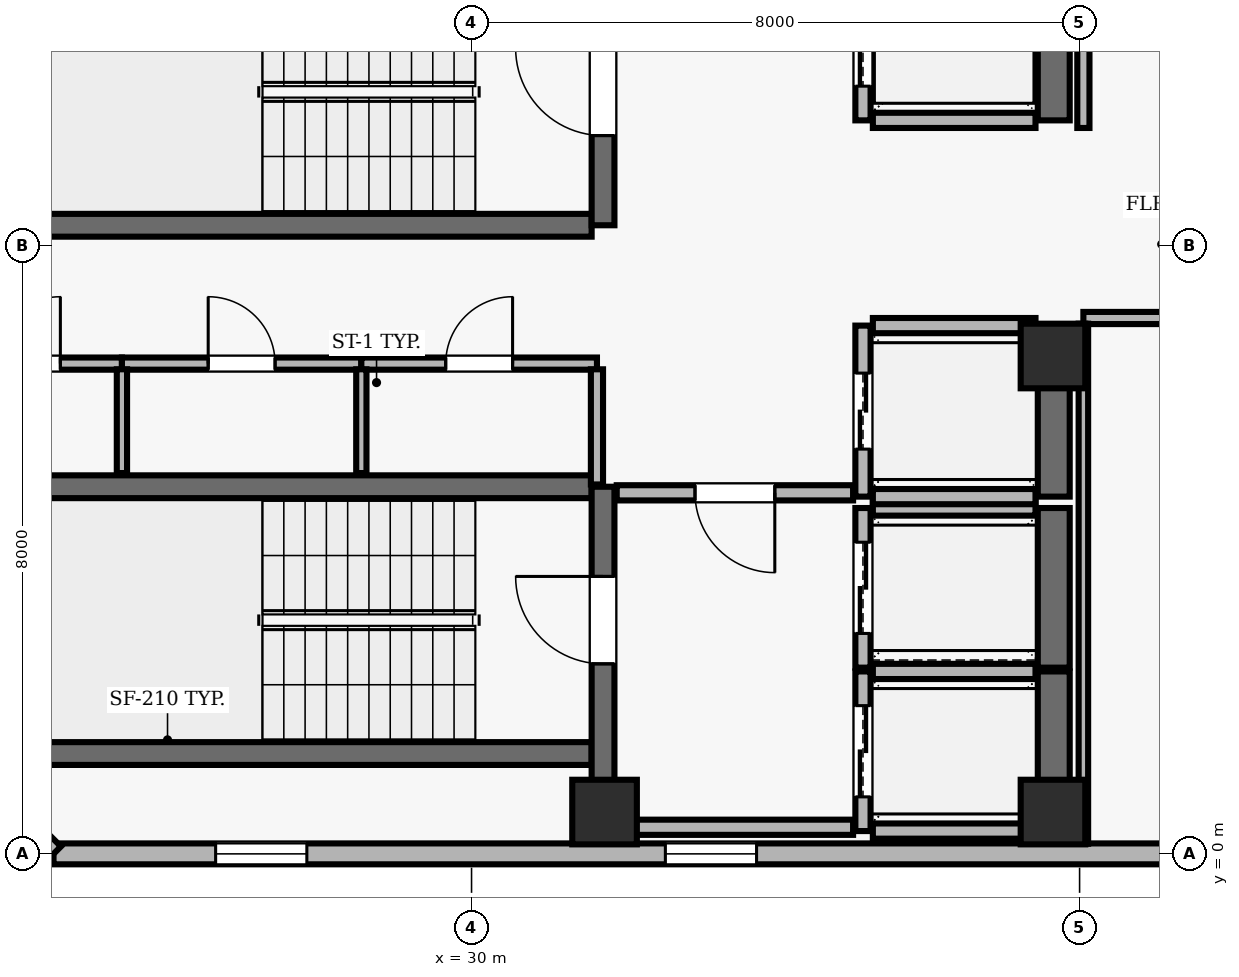
"""IFC4 building model, lengths in metres.
Left out: names, types, materials, properties, quantities, classifications, styles, units other than length and angle.
Written with IfcOpenShell. Run it as: python <this file> out.ifc"""

import sys

from ifc_helpers import new_model, si_unit, direction, frame, frame_2d, origin, origin_2d, place, context, subcontext, project, spatial, rectangle, extrude, element, fill, save


model = new_model("IFC4")
c1 = context("Model", 3, precision=1e-05, world=origin(), true_north=direction((0.0, 1.0)))
c2 = subcontext(c1, "Body", "Model", "MODEL_VIEW")
j1 = project(units=[si_unit("LENGTHUNIT", "METRE"), si_unit("PLANEANGLEUNIT", "RADIAN")], contexts=[c1])
p1 = place(None, origin())
s1 = spatial("IfcSite", under=j1, at=p1, CompositionType="ELEMENT")
p2 = place(p1, origin())
s2 = spatial("IfcBuilding", under=s1, at=p2, CompositionType="ELEMENT")
p3 = place(p2, frame((0.0, 0.0, 248.2)))
s3 = spatial("IfcBuildingStorey", under=s2, at=p3, CompositionType="ELEMENT", Elevation=248.2)
for number, where, z_axis, x_axis in (
    (1, (31.75, 0.55, 0.0), (0.0, 0.0, 1.0), (1.0, 0.0, 0.0)),
    (2, (37.65, 0.55, 0.0), (0.0, 0.0, 1.0), (1.0, 0.0, 0.0)),
    (3, (37.65, 6.55, 0.0), (0.0, 0.0, 1.0), (1.0, 0.0, 0.0)),
):
    element("IfcColumn", number, at=place(p3, frame(where, z_axis=z_axis, x_axis=x_axis)), inside=s3, PredefinedType="COLUMN", context=c2, shape_type="SweptSolid", body=[
        extrude(rectangle(XDim=0.85, YDim=0.85, at=origin_2d()), origin(), (0.0, 0.0, 1.0), 3.9),
    ])
p4 = place(p3, frame((24.5, 0.0, 0.0), z_axis=(0.0, 0.0, 1.0), x_axis=(1.0, 0.0, 0.0)))
e4 = element("IfcWall", 4, at=p4, inside=s3, PredefinedType="SOLIDWALL", context=c2, shape_type="SweptSolid", body=[
    extrude(rectangle(XDim=32.8, YDim=0.275, at=frame_2d((16.4, 0.0))), origin(), (0.0, 0.0, 1.0), 3.69),
])
p5 = place(p4, frame((2.133, 0.0, 0.9)))
e5 = element("IfcOpeningElement", 5, at=p5, cuts=e4, PredefinedType="OPENING", context=c2, shape_type="SweptSolid", body=[
    extrude(rectangle(XDim=1.2, YDim=1.6, at=frame_2d((0.6, 0.8))), frame((0.0, 0.147, 0.0), z_axis=(0.0, -1.0, 0.0), x_axis=(1.0, 0.0, 0.0)), (0.0, 0.0, 1.0), 0.295),
])
p6 = place(p4, frame((8.05, 0.0, 0.9)))
e6 = element("IfcOpeningElement", 6, at=p6, cuts=e4, PredefinedType="OPENING", context=c2, shape_type="SweptSolid", body=[
    extrude(rectangle(XDim=1.2, YDim=1.6, at=frame_2d((0.6, 0.8))), frame((0.0, 0.147, 0.0), z_axis=(0.0, -1.0, 0.0), x_axis=(1.0, 0.0, 0.0)), (0.0, 0.0, 1.0), 0.295),
])
p7 = place(p4, frame((24.9, 0.0, 0.9)))
e7 = element("IfcOpeningElement", 7, at=p7, cuts=e4, PredefinedType="OPENING", context=c2, shape_type="SweptSolid", body=[
    extrude(rectangle(XDim=1.2, YDim=1.6, at=frame_2d((0.6, 0.8))), frame((0.0, 0.147, 0.0), z_axis=(0.0, -1.0, 0.0), x_axis=(1.0, 0.0, 0.0)), (0.0, 0.0, 1.0), 0.295),
])
p8 = place(p3, frame((22.0, 2.5, 0.0), z_axis=(0.0, 0.0, 1.0), x_axis=(0.707106781187, -0.707106781187, 0.0)))
e8 = element("IfcWall", 8, at=p8, inside=s3, PredefinedType="SOLIDWALL", context=c2, shape_type="SweptSolid", body=[
    extrude(rectangle(XDim=3.536, YDim=0.275, at=frame_2d((1.768, 0.0))), origin(), (0.0, 0.0, 1.0), 3.69),
])
for number, where, z_axis, x_axis in (
    (9, (31.58, 4.83, 0.0), (0.0, 0.0, 1.0), (-1.0, 0.0, 0.0)),
    (10, (23.22, 1.32, 0.0), (0.0, 0.0, 1.0), (1.0, 0.0, 0.0)),
):
    element("IfcWall", number, at=place(p3, frame(where, z_axis=z_axis, x_axis=x_axis)), inside=s3, PredefinedType="SHEAR", context=c2, shape_type="SweptSolid", body=[
        extrude(rectangle(XDim=8.36, YDim=0.3, at=frame_2d((4.18, 0.0))), origin(), (0.0, 0.0, 1.0), 3.69),
    ])
p9 = place(p3, frame((31.73, 0.96, 0.0), z_axis=(0.0, 0.0, 1.0), x_axis=(0.0, 1.0, 0.0)))
e11 = element("IfcWall", 11, at=p9, inside=s3, PredefinedType="SHEAR", context=c2, shape_type="SweptSolid", body=[
    extrude(rectangle(XDim=3.87, YDim=0.3, at=frame_2d((1.935, 0.0))), origin(), (0.0, 0.0, 1.0), 3.69),
])
p10 = place(p9, frame((1.54, 0.0, 0.0)))
e12 = element("IfcOpeningElement", 12, at=p10, cuts=e11, PredefinedType="OPENING", context=c2, shape_type="SweptSolid", body=[
    extrude(rectangle(XDim=1.15, YDim=2.15, at=frame_2d((0.575, 1.075))), frame((0.0, 0.16, 0.0), z_axis=(0.0, -1.0, 0.0), x_axis=(1.0, 0.0, 0.0)), (0.0, 0.0, 1.0), 0.32),
])
p11 = place(p3, frame((23.22, 8.27, 0.0), z_axis=(0.0, 0.0, 1.0), x_axis=(1.0, 0.0, 0.0)))
e13 = element("IfcWall", 13, at=p11, inside=s3, PredefinedType="SHEAR", context=c2, shape_type="SweptSolid", body=[
    extrude(rectangle(XDim=8.36, YDim=0.3, at=frame_2d((4.18, 0.0))), origin(), (0.0, 0.0, 1.0), 3.69),
])
p12 = place(p3, frame((31.73, 8.27, 0.0), z_axis=(0.0, 0.0, 1.0), x_axis=(0.0, 1.0, 0.0)))
e14 = element("IfcWall", 14, at=p12, inside=s3, PredefinedType="SHEAR", context=c2, shape_type="SweptSolid", body=[
    extrude(rectangle(XDim=3.51, YDim=0.3, at=frame_2d((1.755, 0.0))), origin(), (0.0, 0.0, 1.0), 3.69),
])
p13 = place(p12, frame((1.18, 0.0, 0.0)))
e15 = element("IfcOpeningElement", 15, at=p13, cuts=e14, PredefinedType="OPENING", context=c2, shape_type="SweptSolid", body=[
    extrude(rectangle(XDim=1.15, YDim=2.15, at=frame_2d((0.575, 1.075))), frame((0.0, 0.16, 0.0), z_axis=(0.0, -1.0, 0.0), x_axis=(1.0, 0.0, 0.0)), (0.0, 0.0, 1.0), 0.32),
])
p14 = place(p3, frame((35.15, 2.4, 0.0), z_axis=(0.0, 0.0, 1.0), x_axis=(0.0, -1.0, 0.0)))
e16 = element("IfcWall", 16, at=p14, inside=s3, PredefinedType="SOLIDWALL", context=c2, shape_type="SweptSolid", body=[
    extrude(rectangle(XDim=2.1, YDim=0.2, at=frame_2d((1.05, 0.0))), origin(), (0.0, 0.0, 1.0), 3.69),
])
p15 = place(p14, frame((0.45, 0.0, 0.0)))
e17 = element("IfcOpeningElement", 17, at=p15, cuts=e16, PredefinedType="OPENING", context=c2, shape_type="SweptSolid", body=[
    extrude(rectangle(XDim=1.2, YDim=2.15, at=frame_2d((0.6, 1.075))), frame((0.0, 0.11, 0.0), z_axis=(0.0, -1.0, 0.0), x_axis=(1.0, 0.0, 0.0)), (0.0, 0.0, 1.0), 0.22),
])
p16 = place(p3, frame((37.66, 0.3, 0.0), z_axis=(0.0, 0.0, 1.0), x_axis=(0.0, 1.0, 0.0)))
e18 = element("IfcWall", 18, at=p16, inside=s3, PredefinedType="SHEAR", context=c2, shape_type="SweptSolid", body=[
    extrude(rectangle(XDim=2.1, YDim=0.42, at=frame_2d((1.05, 0.0))), origin(), (0.0, 0.0, 1.0), 3.69),
])
for number, where, z_axis, x_axis in (
    (19, (35.28, 0.3, 0.0), (0.0, 0.0, 1.0), (1.0, 0.0, 0.0)),
    (20, (37.42, 2.4, 0.0), (0.0, 0.0, 1.0), (-1.0, 0.0, 0.0)),
):
    element("IfcWall", number, at=place(p3, frame(where, z_axis=z_axis, x_axis=x_axis)), inside=s3, PredefinedType="SOLIDWALL", context=c2, shape_type="SweptSolid", body=[
        extrude(rectangle(XDim=2.14, YDim=0.2, at=frame_2d((1.07, 0.0))), origin(), (0.0, 0.0, 1.0), 3.69),
    ])
p17 = place(p3, frame((35.15, 4.55, 0.0), z_axis=(0.0, 0.0, 1.0), x_axis=(0.0, -1.0, 0.0)))
e21 = element("IfcWall", 21, at=p17, inside=s3, PredefinedType="SOLIDWALL", context=c2, shape_type="SweptSolid", body=[
    extrude(rectangle(XDim=2.1, YDim=0.2, at=frame_2d((1.05, 0.0))), origin(), (0.0, 0.0, 1.0), 3.69),
])
p18 = place(p17, frame((0.45, 0.0, 0.0)))
e22 = element("IfcOpeningElement", 22, at=p18, cuts=e21, PredefinedType="OPENING", context=c2, shape_type="SweptSolid", body=[
    extrude(rectangle(XDim=1.2, YDim=2.15, at=frame_2d((0.6, 1.075))), frame((0.0, 0.11, 0.0), z_axis=(0.0, -1.0, 0.0), x_axis=(1.0, 0.0, 0.0)), (0.0, 0.0, 1.0), 0.22),
])
p19 = place(p3, frame((37.66, 2.45, 0.0), z_axis=(0.0, 0.0, 1.0), x_axis=(0.0, 1.0, 0.0)))
e23 = element("IfcWall", 23, at=p19, inside=s3, PredefinedType="SHEAR", context=c2, shape_type="SweptSolid", body=[
    extrude(rectangle(XDim=2.1, YDim=0.42, at=frame_2d((1.05, 0.0))), origin(), (0.0, 0.0, 1.0), 3.69),
])
p20 = place(p3, frame((37.42, 4.55, 0.0), z_axis=(0.0, 0.0, 1.0), x_axis=(-1.0, 0.0, 0.0)))
e24 = element("IfcWall", 24, at=p20, inside=s3, PredefinedType="SOLIDWALL", context=c2, shape_type="SweptSolid", body=[
    extrude(rectangle(XDim=2.14, YDim=0.2, at=frame_2d((1.07, 0.0))), origin(), (0.0, 0.0, 1.0), 3.69),
])
p21 = place(p3, frame((35.15, 6.95, 0.0), z_axis=(0.0, 0.0, 1.0), x_axis=(0.0, -1.0, 0.0)))
e25 = element("IfcWall", 25, at=p21, inside=s3, PredefinedType="SOLIDWALL", context=c2, shape_type="SweptSolid", body=[
    extrude(rectangle(XDim=2.25, YDim=0.2, at=frame_2d((1.125, 0.0))), origin(), (0.0, 0.0, 1.0), 3.69),
])
p22 = place(p21, frame((0.625, 0.0, 0.0)))
e26 = element("IfcOpeningElement", 26, at=p22, cuts=e25, PredefinedType="OPENING", context=c2, shape_type="SweptSolid", body=[
    extrude(rectangle(XDim=1.0, YDim=2.1, at=frame_2d((0.5, 1.05))), frame((0.0, 0.11, 0.0), z_axis=(0.0, -1.0, 0.0), x_axis=(1.0, 0.0, 0.0)), (0.0, 0.0, 1.0), 0.22),
])
p23 = place(p3, frame((37.66, 4.7, 0.0), z_axis=(0.0, 0.0, 1.0), x_axis=(0.0, 1.0, 0.0)))
e27 = element("IfcWall", 27, at=p23, inside=s3, PredefinedType="SHEAR", context=c2, shape_type="SweptSolid", body=[
    extrude(rectangle(XDim=2.25, YDim=0.42, at=frame_2d((1.125, 0.0))), origin(), (0.0, 0.0, 1.0), 3.69),
])
for number, where, z_axis, x_axis in (
    (28, (35.28, 4.7, 0.0), (0.0, 0.0, 1.0), (1.0, 0.0, 0.0)),
    (29, (37.42, 6.95, 0.0), (0.0, 0.0, 1.0), (-1.0, 0.0, 0.0)),
):
    element("IfcWall", number, at=place(p3, frame(where, z_axis=z_axis, x_axis=x_axis)), inside=s3, PredefinedType="SOLIDWALL", context=c2, shape_type="SweptSolid", body=[
        extrude(rectangle(XDim=2.14, YDim=0.2, at=frame_2d((1.07, 0.0))), origin(), (0.0, 0.0, 1.0), 3.69),
    ])
p24 = place(p3, frame((35.15, 11.55, 0.0), z_axis=(0.0, 0.0, 1.0), x_axis=(0.0, -1.0, 0.0)))
e30 = element("IfcWall", 30, at=p24, inside=s3, PredefinedType="SOLIDWALL", context=c2, shape_type="SweptSolid", body=[
    extrude(rectangle(XDim=1.9, YDim=0.2, at=frame_2d((0.95, 0.0))), origin(), (0.0, 0.0, 1.0), 3.69),
])
p25 = place(p24, frame((0.45, 0.0, 0.0)))
e31 = element("IfcOpeningElement", 31, at=p25, cuts=e30, PredefinedType="OPENING", context=c2, shape_type="SweptSolid", body=[
    extrude(rectangle(XDim=1.0, YDim=2.1, at=frame_2d((0.5, 1.05))), frame((0.0, 0.11, 0.0), z_axis=(0.0, -1.0, 0.0), x_axis=(1.0, 0.0, 0.0)), (0.0, 0.0, 1.0), 0.22),
])
p26 = place(p3, frame((37.66, 9.65, 0.0), z_axis=(0.0, 0.0, 1.0), x_axis=(0.0, 1.0, 0.0)))
e32 = element("IfcWall", 32, at=p26, inside=s3, PredefinedType="SHEAR", context=c2, shape_type="SweptSolid", body=[
    extrude(rectangle(XDim=1.9, YDim=0.42, at=frame_2d((0.95, 0.0))), origin(), (0.0, 0.0, 1.0), 3.69),
])
p27 = place(p3, frame((35.28, 9.65, 0.0), z_axis=(0.0, 0.0, 1.0), x_axis=(1.0, 0.0, 0.0)))
e33 = element("IfcWall", 33, at=p27, inside=s3, PredefinedType="SOLIDWALL", context=c2, shape_type="SweptSolid", body=[
    extrude(rectangle(XDim=2.14, YDim=0.2, at=frame_2d((1.07, 0.0))), origin(), (0.0, 0.0, 1.0), 3.69),
])
p28 = place(p3, frame((22.2, 6.45, 0.0), z_axis=(0.0, 0.0, 1.0), x_axis=(1.0, 0.0, 0.0)))
e34 = element("IfcWall", 34, at=p28, inside=s3, PredefinedType="PARTITIONING", context=c2, shape_type="SweptSolid", body=[
    extrude(rectangle(XDim=3.2, YDim=0.16, at=frame_2d((1.6, 0.0))), origin(), (0.0, 0.0, 1.0), 3.69),
])
p29 = place(p28, frame((1.51, 0.0, 0.0)))
e35 = element("IfcOpeningElement", 35, at=p29, cuts=e34, PredefinedType="OPENING", context=c2, shape_type="SweptSolid", body=[
    extrude(rectangle(XDim=0.88, YDim=2.1, at=frame_2d((0.44, 1.05))), frame((0.0, 0.09, 0.0), z_axis=(0.0, -1.0, 0.0), x_axis=(1.0, 0.0, 0.0)), (0.0, 0.0, 1.0), 0.18),
])
p30 = place(p3, frame((25.4, 6.45, 0.0), z_axis=(0.0, 0.0, 1.0), x_axis=(1.0, 0.0, 0.0)))
e36 = element("IfcWall", 36, at=p30, inside=s3, PredefinedType="PARTITIONING", context=c2, shape_type="SweptSolid", body=[
    extrude(rectangle(XDim=3.15, YDim=0.16, at=frame_2d((1.575, 0.0))), origin(), (0.0, 0.0, 1.0), 3.69),
])
p31 = place(p30, frame((1.135, 0.0, 0.0)))
e37 = element("IfcOpeningElement", 37, at=p31, cuts=e36, PredefinedType="OPENING", context=c2, shape_type="SweptSolid", body=[
    extrude(rectangle(XDim=0.88, YDim=2.1, at=frame_2d((0.44, 1.05))), frame((0.0, 0.09, 0.0), z_axis=(0.0, -1.0, 0.0), x_axis=(1.0, 0.0, 0.0)), (0.0, 0.0, 1.0), 0.18),
])
p32 = place(p3, frame((28.55, 6.45, 0.0), z_axis=(0.0, 0.0, 1.0), x_axis=(1.0, 0.0, 0.0)))
e38 = element("IfcWall", 38, at=p32, inside=s3, PredefinedType="PARTITIONING", context=c2, shape_type="SweptSolid", body=[
    extrude(rectangle(XDim=3.1, YDim=0.16, at=frame_2d((1.55, 0.0))), origin(), (0.0, 0.0, 1.0), 3.69),
])
p33 = place(p32, frame((1.11, 0.0, 0.0)))
e39 = element("IfcOpeningElement", 39, at=p33, cuts=e38, PredefinedType="OPENING", context=c2, shape_type="SweptSolid", body=[
    extrude(rectangle(XDim=0.88, YDim=2.1, at=frame_2d((0.44, 1.05))), frame((0.0, 0.09, 0.0), z_axis=(0.0, -1.0, 0.0), x_axis=(1.0, 0.0, 0.0)), (0.0, 0.0, 1.0), 0.18),
])
p34 = place(p3, frame((31.65, 0.35, 0.0), z_axis=(0.0, 0.0, 1.0), x_axis=(1.0, 0.0, 0.0)))
e40 = element("IfcWall", 40, at=p34, inside=s3, PredefinedType="SOLIDWALL", context=c2, shape_type="SweptSolid", body=[
    extrude(rectangle(XDim=3.37, YDim=0.2, at=frame_2d((1.685, 0.0))), origin(), (0.0, 0.0, 1.0), 3.69),
])
p35 = place(p3, frame((35.02, 4.75, 0.0), z_axis=(0.0, 0.0, 1.0), x_axis=(-1.0, 0.0, 0.0)))
e41 = element("IfcWall", 41, at=p35, inside=s3, PredefinedType="SOLIDWALL", context=c2, shape_type="SweptSolid", body=[
    extrude(rectangle(XDim=3.11, YDim=0.2, at=frame_2d((1.555, 0.0))), origin(), (0.0, 0.0, 1.0), 3.69),
])
p36 = place(p35, frame((1.03, 0.0, 0.0)))
e42 = element("IfcOpeningElement", 42, at=p36, cuts=e41, PredefinedType="OPENING", context=c2, shape_type="SweptSolid", body=[
    extrude(rectangle(XDim=1.05, YDim=2.15, at=frame_2d((0.525, 1.075))), frame((0.0, 0.11, 0.0), z_axis=(0.0, -1.0, 0.0), x_axis=(1.0, 0.0, 0.0)), (0.0, 0.0, 1.0), 0.22),
])
p37 = place(p3, frame((38.05, 7.05, 0.0), z_axis=(0.0, 0.0, 1.0), x_axis=(1.0, 0.0, 0.0)))
e43 = element("IfcWall", 43, at=p37, inside=s3, PredefinedType="PARTITIONING", context=c2, shape_type="SweptSolid", body=[
    extrude(rectangle(XDim=5.35, YDim=0.16, at=frame_2d((2.675, 0.0))), origin(), (0.0, 0.0, 1.0), 3.69),
])
p38 = place(p37, frame((2.175, 0.0, 0.0)))
e44 = element("IfcOpeningElement", 44, at=p38, cuts=e43, PredefinedType="OPENING", context=c2, shape_type="SweptSolid", body=[
    extrude(rectangle(XDim=1.0, YDim=2.1, at=frame_2d((0.5, 1.05))), frame((0.0, 0.09, 0.0), z_axis=(0.0, -1.0, 0.0), x_axis=(1.0, 0.0, 0.0)), (0.0, 0.0, 1.0), 0.18),
])
for number, where, z_axis, x_axis in (
    (45, (25.4, 5.01, 0.0), (0.0, 0.0, 1.0), (0.0, 1.0, 0.0)),
    (46, (28.55, 5.01, 0.0), (0.0, 0.0, 1.0), (0.0, 1.0, 0.0)),
):
    element("IfcWall", number, at=place(p3, frame(where, z_axis=z_axis, x_axis=x_axis)), inside=s3, PredefinedType="PARTITIONING", context=c2, shape_type="SweptSolid", body=[
        extrude(rectangle(XDim=1.365, YDim=0.135, at=frame_2d((0.683, 0.0))), origin(), (0.0, 0.0, 1.0), 3.69),
    ])
p39 = place(p3, frame((31.65, 4.86, 0.0), z_axis=(0.0, 0.0, 1.0), x_axis=(0.0, 1.0, 0.0)))
e47 = element("IfcWall", 47, at=p39, inside=s3, PredefinedType="PARTITIONING", context=c2, shape_type="SweptSolid", body=[
    extrude(rectangle(XDim=1.515, YDim=0.16, at=frame_2d((0.757, 0.0))), origin(), (0.0, 0.0, 1.0), 3.69),
])
p40 = place(p3, frame((38.05, 6.975, 0.0), z_axis=(0.0, 0.0, 1.0), x_axis=(0.0, -1.0, 0.0)))
e48 = element("IfcWall", 48, at=p40, inside=s3, PredefinedType="PARTITIONING", context=c2, shape_type="SweptSolid", body=[
    extrude(rectangle(XDim=6.842, YDim=0.125, at=frame_2d((3.421, 0.0))), origin(), (0.0, 0.0, 1.0), 3.221),
])
p41 = place(p3, frame((38.05, 15.925, 0.0), z_axis=(0.0, 0.0, 1.0), x_axis=(0.0, -1.0, 0.0)))
e49 = element("IfcWall", 49, at=p41, inside=s3, PredefinedType="PARTITIONING", context=c2, shape_type="SweptSolid", body=[
    extrude(rectangle(XDim=6.375, YDim=0.16, at=frame_2d((3.188, 0.0))), origin(), (0.0, 0.0, 1.0), 3.221),
])
p42 = place(p5, origin())
e50 = element("IfcWindow", 50, at=p42, inside=s3, PartitioningType="SINGLE_PANEL", PredefinedType="WINDOW", context=c2, shape_type="SweptSolid", body=[
    extrude(rectangle(XDim=1.2, YDim=1.6, at=frame_2d((0.6, 0.8))), frame((0.0, 0.03, 0.0), z_axis=(0.0, -1.0, 0.0), x_axis=(1.0, 0.0, 0.0)), (0.0, 0.0, 1.0), 0.06),
])
fill(e5, e50)
p43 = place(p6, origin())
e51 = element("IfcWindow", 51, at=p43, inside=s3, PartitioningType="SINGLE_PANEL", PredefinedType="WINDOW", context=c2, shape_type="SweptSolid", body=[
    extrude(rectangle(XDim=1.2, YDim=1.6, at=frame_2d((0.6, 0.8))), frame((0.0, 0.03, 0.0), z_axis=(0.0, -1.0, 0.0), x_axis=(1.0, 0.0, 0.0)), (0.0, 0.0, 1.0), 0.06),
])
fill(e6, e51)
p44 = place(p10, origin())
e52 = element("IfcDoor", 52, at=p44, inside=s3, OperationType="SINGLE_SWING_RIGHT", PredefinedType="DOOR", context=c2, shape_type="SweptSolid", body=[
    extrude(rectangle(XDim=1.15, YDim=2.15, at=frame_2d((0.575, 1.075))), frame((0.0, 0.025, 0.0), z_axis=(0.0, -1.0, 0.0), x_axis=(1.0, 0.0, 0.0)), (0.0, 0.0, 1.0), 0.05),
])
fill(e12, e52)
p45 = place(p13, origin())
e53 = element("IfcDoor", 53, at=p45, inside=s3, OperationType="SINGLE_SWING_RIGHT", PredefinedType="DOOR", context=c2, shape_type="SweptSolid", body=[
    extrude(rectangle(XDim=1.15, YDim=2.15, at=frame_2d((0.575, 1.075))), frame((0.0, 0.025, 0.0), z_axis=(0.0, -1.0, 0.0), x_axis=(1.0, 0.0, 0.0)), (0.0, 0.0, 1.0), 0.05),
])
fill(e15, e53)
p46 = place(p15, origin())
e54 = element("IfcDoor", 54, at=p46, inside=s3, OperationType="DOUBLE_DOOR_SLIDING", PredefinedType="DOOR", context=c2, shape_type="SweptSolid", body=[
    extrude(rectangle(XDim=1.2, YDim=2.15, at=frame_2d((0.6, 1.075))), frame((0.0, 0.025, 0.0), z_axis=(0.0, -1.0, 0.0), x_axis=(1.0, 0.0, 0.0)), (0.0, 0.0, 1.0), 0.05),
])
fill(e17, e54)
p47 = place(p18, origin())
e55 = element("IfcDoor", 55, at=p47, inside=s3, OperationType="DOUBLE_DOOR_SLIDING", PredefinedType="DOOR", context=c2, shape_type="SweptSolid", body=[
    extrude(rectangle(XDim=1.2, YDim=2.15, at=frame_2d((0.6, 1.075))), frame((0.0, 0.025, 0.0), z_axis=(0.0, -1.0, 0.0), x_axis=(1.0, 0.0, 0.0)), (0.0, 0.0, 1.0), 0.05),
])
fill(e22, e55)
p48 = place(p22, origin())
e56 = element("IfcDoor", 56, at=p48, inside=s3, OperationType="DOUBLE_DOOR_SLIDING", PredefinedType="DOOR", context=c2, shape_type="SweptSolid", body=[
    extrude(rectangle(XDim=1.0, YDim=2.1, at=frame_2d((0.5, 1.05))), frame((0.0, 0.025, 0.0), z_axis=(0.0, -1.0, 0.0), x_axis=(1.0, 0.0, 0.0)), (0.0, 0.0, 1.0), 0.05),
])
fill(e26, e56)
p49 = place(p25, origin())
e57 = element("IfcDoor", 57, at=p49, inside=s3, OperationType="DOUBLE_DOOR_SLIDING", PredefinedType="DOOR", context=c2, shape_type="SweptSolid", body=[
    extrude(rectangle(XDim=1.0, YDim=2.1, at=frame_2d((0.5, 1.05))), frame((0.0, 0.025, 0.0), z_axis=(0.0, -1.0, 0.0), x_axis=(1.0, 0.0, 0.0)), (0.0, 0.0, 1.0), 0.05),
])
fill(e31, e57)
p50 = place(p36, origin())
e58 = element("IfcDoor", 58, at=p50, inside=s3, OperationType="SINGLE_SWING_LEFT", PredefinedType="DOOR", context=c2, shape_type="SweptSolid", body=[
    extrude(rectangle(XDim=1.05, YDim=2.15, at=frame_2d((0.525, 1.075))), frame((0.0, 0.025, 0.0), z_axis=(0.0, -1.0, 0.0), x_axis=(1.0, 0.0, 0.0)), (0.0, 0.0, 1.0), 0.05),
])
fill(e42, e58)
p51 = place(p29, origin())
e59 = element("IfcDoor", 59, at=p51, inside=s3, OperationType="SINGLE_SWING_RIGHT", PredefinedType="DOOR", context=c2, shape_type="SweptSolid", body=[
    extrude(rectangle(XDim=0.88, YDim=2.1, at=frame_2d((0.44, 1.05))), frame((0.0, 0.025, 0.0), z_axis=(0.0, -1.0, 0.0), x_axis=(1.0, 0.0, 0.0)), (0.0, 0.0, 1.0), 0.05),
])
fill(e35, e59)
p52 = place(p31, origin())
e60 = element("IfcDoor", 60, at=p52, inside=s3, OperationType="SINGLE_SWING_LEFT", PredefinedType="DOOR", context=c2, shape_type="SweptSolid", body=[
    extrude(rectangle(XDim=0.88, YDim=2.1, at=frame_2d((0.44, 1.05))), frame((0.0, 0.025, 0.0), z_axis=(0.0, -1.0, 0.0), x_axis=(1.0, 0.0, 0.0)), (0.0, 0.0, 1.0), 0.05),
])
fill(e37, e60)
p53 = place(p33, origin())
e61 = element("IfcDoor", 61, at=p53, inside=s3, OperationType="SINGLE_SWING_RIGHT", PredefinedType="DOOR", context=c2, shape_type="SweptSolid", body=[
    extrude(rectangle(XDim=0.88, YDim=2.1, at=frame_2d((0.44, 1.05))), frame((0.0, 0.025, 0.0), z_axis=(0.0, -1.0, 0.0), x_axis=(1.0, 0.0, 0.0)), (0.0, 0.0, 1.0), 0.05),
])
fill(e39, e61)
save(model, sys.argv[1])
